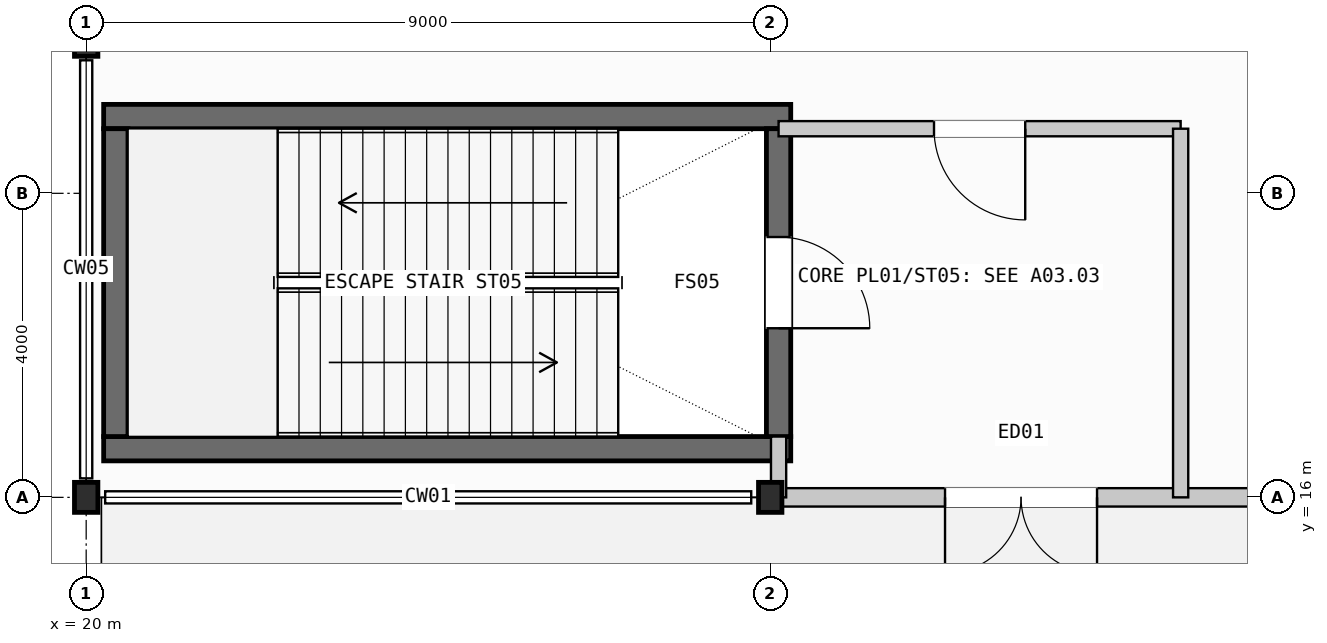
"""IFC4 building model, lengths in metres.
Left out: names, types, materials, properties, quantities, classifications, styles, units other than length and angle.
Written with IfcOpenShell. Run it as: python <this file> out.ifc"""

import sys

from ifc_helpers import new_model, si_unit, direction, frame, frame_2d, origin, origin_2d, place, context, subcontext, project, spatial, rectangle, i_section, extrude, element, fill, save


model = new_model("IFC4")
c1 = context("Model", 3, precision=1e-05, world=origin(), true_north=direction((0.0, 1.0)))
c2 = subcontext(c1, "Body", "Model", "MODEL_VIEW")
j1 = project(units=[si_unit("LENGTHUNIT", "METRE"), si_unit("PLANEANGLEUNIT", "RADIAN")], contexts=[c1])
p1 = place(None, origin())
s1 = spatial("IfcSite", under=j1, at=p1, CompositionType="ELEMENT")
p2 = place(p1, origin())
s2 = spatial("IfcBuilding", under=s1, at=p2, CompositionType="ELEMENT")
p3 = place(p2, origin())
s3 = spatial("IfcBuildingStorey", under=s2, at=p3, CompositionType="ELEMENT", Elevation=0.0)
for number, where, z_axis, x_axis in (
    (1, (20.0, 16.0, 0.0), (0.0, 0.0, 1.0), (1.0, 0.0, 0.0)),
    (2, (20.0, 22.0, 0.0), (0.0, 0.0, 1.0), (1.0, 0.0, 0.0)),
    (3, (29.0, 16.0, 0.0), (0.0, 0.0, 1.0), (1.0, 0.0, 0.0)),
):
    element("IfcColumn", number, at=place(p3, frame(where, z_axis=z_axis, x_axis=x_axis)), inside=s3, PredefinedType="COLUMN", context=c2, shape_type="SweptSolid", body=[
        extrude(i_section(OverallWidth=0.308, OverallDepth=0.395, WebThickness=0.021, FlangeThickness=0.04, FilletRadius=0.027, at=origin_2d()), origin(), (0.0, 0.0, 1.0), 6.0),
    ])
for number, where, z_axis, x_axis in (
    (4, (20.23, 16.64, 0.0), (0.0, 0.0, 1.0), (1.0, 0.0, 0.0)),
    (5, (20.23, 21.01, 0.0), (0.0, 0.0, 1.0), (1.0, 0.0, 0.0)),
):
    element("IfcWall", number, at=place(p3, frame(where, z_axis=z_axis, x_axis=x_axis)), inside=s3, PredefinedType="SHEAR", context=c2, shape_type="SweptSolid", body=[
        extrude(rectangle(XDim=9.04, YDim=0.32, at=frame_2d((4.52, 0.0))), origin(), (0.0, 0.0, 1.0), 6.0),
    ])
p4 = place(p3, frame((20.39, 16.8, 0.0), z_axis=(0.0, 0.0, 1.0), x_axis=(0.0, 1.0, 0.0)))
e6 = element("IfcWall", 6, at=p4, inside=s3, PredefinedType="SHEAR", context=c2, shape_type="SweptSolid", body=[
    extrude(rectangle(XDim=4.05, YDim=0.32, at=frame_2d((2.025, 0.0))), origin(), (0.0, 0.0, 1.0), 6.0),
])
p5 = place(p3, frame((29.11, 16.8, 0.0), z_axis=(0.0, 0.0, 1.0), x_axis=(0.0, 1.0, 0.0)))
e7 = element("IfcWall", 7, at=p5, inside=s3, PredefinedType="SHEAR", context=c2, shape_type="SweptSolid", body=[
    extrude(rectangle(XDim=4.05, YDim=0.32, at=frame_2d((2.025, 0.0))), origin(), (0.0, 0.0, 1.0), 6.0),
])
p6 = place(p5, frame((1.425, 0.0, 0.0)))
e8 = element("IfcOpeningElement", 8, at=p6, cuts=e7, PredefinedType="OPENING", context=c2, shape_type="SweptSolid", body=[
    extrude(rectangle(XDim=1.2, YDim=2.2, at=frame_2d((0.6, 1.1))), frame((0.0, 0.17, 0.0), z_axis=(0.0, -1.0, 0.0), x_axis=(1.0, 0.0, 0.0)), (0.0, 0.0, 1.0), 0.34),
])
p7 = place(p3, frame((29.15, 16.0, 0.0), z_axis=(0.0, 0.0, 1.0), x_axis=(1.0, 0.0, 0.0)))
e9 = element("IfcWall", 9, at=p7, inside=s3, PredefinedType="STANDARD", context=c2, shape_type="SweptSolid", body=[
    extrude(rectangle(XDim=8.7, YDim=0.242, at=frame_2d((4.35, 0.0))), origin(), (0.0, 0.0, 1.0), 5.098),
])
p8 = place(p7, frame((2.15, 0.0, 0.0)))
e10 = element("IfcOpeningElement", 10, at=p8, cuts=e9, PredefinedType="OPENING", context=c2, shape_type="SweptSolid", body=[
    extrude(rectangle(XDim=2.0, YDim=2.3, at=frame_2d((1.0, 1.15))), frame((0.0, 0.131, 0.0), z_axis=(0.0, -1.0, 0.0), x_axis=(1.0, 0.0, 0.0)), (0.0, 0.0, 1.0), 0.262),
])
p9 = place(p3, frame((29.11, 20.85, 0.0), z_axis=(0.0, 0.0, 1.0), x_axis=(1.0, 0.0, 0.0)))
e11 = element("IfcWall", 11, at=p9, inside=s3, PredefinedType="PARTITIONING", context=c2, shape_type="SweptSolid", body=[
    extrude(rectangle(XDim=5.29, YDim=0.2, at=frame_2d((2.645, 0.0))), origin(), (0.0, 0.0, 1.0), 4.2),
])
p10 = place(p9, frame((2.045, 0.0, 0.0)))
e12 = element("IfcOpeningElement", 12, at=p10, cuts=e11, PredefinedType="OPENING", context=c2, shape_type="SweptSolid", body=[
    extrude(rectangle(XDim=1.2, YDim=2.2, at=frame_2d((0.6, 1.1))), frame((0.0, 0.11, 0.0), z_axis=(0.0, -1.0, 0.0), x_axis=(1.0, 0.0, 0.0)), (0.0, 0.0, 1.0), 0.22),
])
p11 = place(p3, frame((34.4, 16.0, 0.0), z_axis=(0.0, 0.0, 1.0), x_axis=(0.0, 1.0, 0.0)))
e13 = element("IfcWall", 13, at=p11, inside=s3, PredefinedType="PARTITIONING", context=c2, shape_type="SweptSolid", body=[
    extrude(rectangle(XDim=4.85, YDim=0.2, at=frame_2d((2.425, 0.0))), origin(), (0.0, 0.0, 1.0), 4.2),
])
p12 = place(p3, frame((29.11, 16.0, 0.0), z_axis=(0.0, 0.0, 1.0), x_axis=(0.0, 1.0, 0.0)))
e14 = element("IfcWall", 14, at=p12, inside=s3, PredefinedType="PARTITIONING", context=c2, shape_type="SweptSolid", body=[
    extrude(rectangle(XDim=0.8, YDim=0.2, at=frame_2d((0.4, 0.0))), origin(), (0.0, 0.0, 1.0), 4.2),
])
p13 = place(p6, frame((1.2, 0.0, 0.0), z_axis=(0.0, 0.0, 1.0), x_axis=(-1.0, 0.0, 0.0)))
e15 = element("IfcDoor", 15, at=p13, inside=s3, OperationType="SINGLE_SWING_RIGHT", PredefinedType="DOOR", context=c2, shape_type="SweptSolid", body=[
    extrude(rectangle(XDim=1.2, YDim=2.2, at=frame_2d((0.6, 1.1))), frame((0.0, 0.025, 0.0), z_axis=(0.0, -1.0, 0.0), x_axis=(1.0, 0.0, 0.0)), (0.0, 0.0, 1.0), 0.05),
])
fill(e8, e15)
p14 = place(p8, frame((2.0, 0.0, 0.0), z_axis=(0.0, 0.0, 1.0), x_axis=(-1.0, 0.0, 0.0)))
e16 = element("IfcDoor", 16, at=p14, inside=s3, OperationType="DOUBLE_DOOR_SINGLE_SWING", PredefinedType="DOOR", context=c2, shape_type="SweptSolid", body=[
    extrude(rectangle(XDim=2.0, YDim=2.3, at=frame_2d((1.0, 1.15))), frame((0.0, 0.025, 0.0), z_axis=(0.0, -1.0, 0.0), x_axis=(1.0, 0.0, 0.0)), (0.0, 0.0, 1.0), 0.05),
])
fill(e10, e16)
p15 = place(p10, frame((1.2, 0.0, 0.0), z_axis=(0.0, 0.0, 1.0), x_axis=(-1.0, 0.0, 0.0)))
e17 = element("IfcDoor", 17, at=p15, inside=s3, OperationType="SINGLE_SWING_LEFT", PredefinedType="DOOR", context=c2, shape_type="SweptSolid", body=[
    extrude(rectangle(XDim=1.2, YDim=2.2, at=frame_2d((0.6, 1.1))), frame((0.0, 0.025, 0.0), z_axis=(0.0, -1.0, 0.0), x_axis=(1.0, 0.0, 0.0)), (0.0, 0.0, 1.0), 0.05),
])
fill(e12, e17)
save(model, sys.argv[1])
